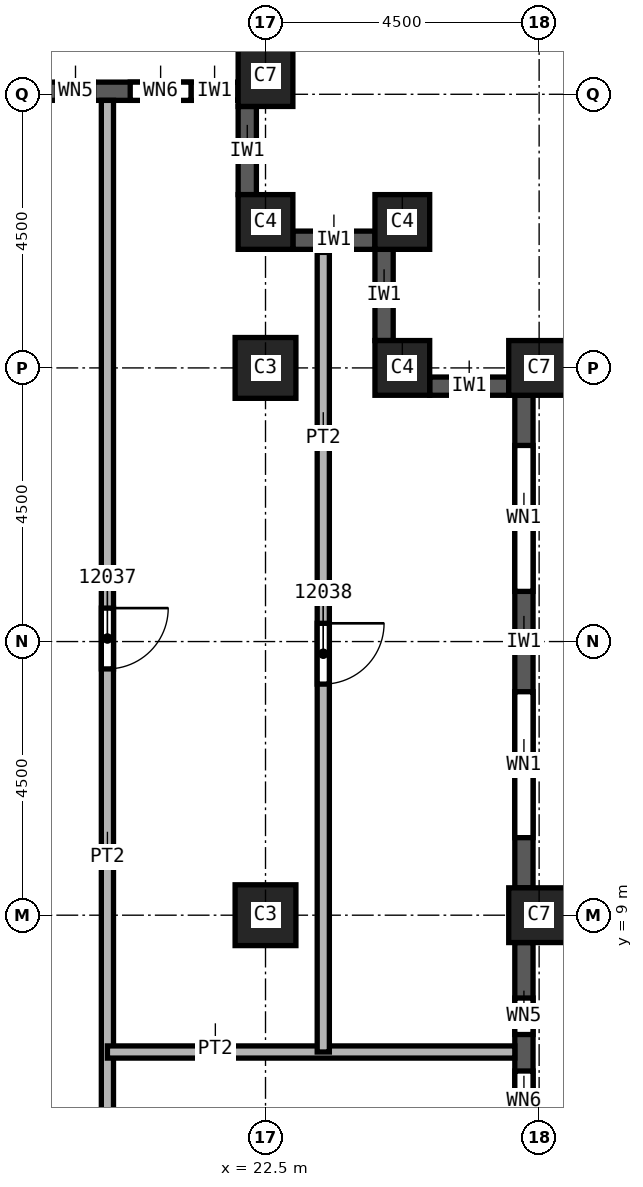
"""IFC4 building model, lengths in metres.
Left out: names, types, materials, properties, quantities, classifications, styles, units other than length and angle.
Written with IfcOpenShell. Run it as: python <this file> out.ifc"""

import sys

from ifc_helpers import new_model, si_unit, direction, frame, frame_2d, origin, origin_2d, place, context, subcontext, project, spatial, rectangle, extrude, element, fill, save


model = new_model("IFC4")
c1 = context("Model", 3, precision=1e-05, world=origin(), true_north=direction((0.0, 1.0)))
c2 = subcontext(c1, "Body", "Model", "MODEL_VIEW")
j1 = project(units=[si_unit("LENGTHUNIT", "METRE"), si_unit("PLANEANGLEUNIT", "RADIAN")], contexts=[c1])
p1 = place(None, origin())
s1 = spatial("IfcSite", under=j1, at=p1, CompositionType="ELEMENT")
p2 = place(p1, origin())
s2 = spatial("IfcBuilding", under=s1, at=p2, CompositionType="ELEMENT")
p3 = place(p2, frame((0.0, 0.0, 196.0)))
s3 = spatial("IfcBuildingStorey", under=s2, at=p3, CompositionType="ELEMENT", Elevation=196.0)
for number, where, z_axis, x_axis in (
    (1, (22.5, 9.0, 0.0), (0.0, 0.0, 1.0), (1.0, 0.0, 0.0)),
    (2, (22.5, 18.0, 0.0), (0.0, 0.0, 1.0), (1.0, 0.0, 0.0)),
):
    element("IfcColumn", number, at=place(p3, frame(where, z_axis=z_axis, x_axis=x_axis)), inside=s3, PredefinedType="COLUMN", context=c2, shape_type="SweptSolid", body=[
        extrude(rectangle(XDim=1.0, YDim=1.0, at=origin_2d()), origin(), (0.0, 0.0, 1.0), 3.72),
    ])
for number, where, z_axis, x_axis in (
    (3, (27.0, 9.0, 0.0), (0.0, 0.0, 1.0), (0.0, 1.0, 0.0)),
    (4, (27.0, 18.0, 0.0), (0.0, 0.0, 1.0), (0.0, 1.0, 0.0)),
    (5, (22.5, 22.8, 0.0), (0.0, 0.0, 1.0), (1.0, 0.0, 0.0)),
):
    element("IfcColumn", number, at=place(p3, frame(where, z_axis=z_axis, x_axis=x_axis)), inside=s3, PredefinedType="COLUMN", context=c2, shape_type="SweptSolid", body=[
        extrude(rectangle(XDim=0.9, YDim=1.0, at=origin_2d()), origin(), (0.0, 0.0, 1.0), 3.72),
    ])
for number, where, z_axis, x_axis in (
    (6, (22.5, 20.4, 0.0), (0.0, 0.0, 1.0), (1.0, 0.0, 0.0)),
    (7, (24.75, 20.4, 0.0), (0.0, 0.0, 1.0), (1.0, 0.0, 0.0)),
    (8, (24.75, 18.0, 0.0), (0.0, 0.0, 1.0), (1.0, 0.0, 0.0)),
):
    element("IfcColumn", number, at=place(p3, frame(where, z_axis=z_axis, x_axis=x_axis)), inside=s3, PredefinedType="COLUMN", context=c2, shape_type="SweptSolid", body=[
        extrude(rectangle(XDim=0.9, YDim=0.9, at=origin_2d()), origin(), (0.0, 0.0, 1.0), 3.72),
    ])
p4 = place(p3, frame((26.75, 0.45, 0.0), z_axis=(0.0, 0.0, 1.0), x_axis=(0.0, 1.0, 0.0)))
e9 = element("IfcWall", 9, at=p4, inside=s3, PredefinedType="SOLIDWALL", context=c2, shape_type="SweptSolid", body=[
    extrude(rectangle(XDim=8.1, YDim=0.3, at=frame_2d((4.05, 0.0))), origin(), (0.0, 0.0, 1.0), 3.12),
])
p5 = place(p4, frame((0.825, 0.0, 0.8)))
e10 = element("IfcOpeningElement", 10, at=p5, cuts=e9, PredefinedType="OPENING", context=c2, shape_type="SweptSolid", body=[
    extrude(rectangle(XDim=2.4, YDim=1.95, at=frame_2d((1.2, 0.975))), frame((0.0, 0.15, 0.0), z_axis=(0.0, -1.0, 0.0), x_axis=(1.0, 0.0, 0.0)), (0.0, 0.0, 1.0), 0.3),
])
p6 = place(p4, frame((4.988, 0.0, 0.8)))
e11 = element("IfcOpeningElement", 11, at=p6, cuts=e9, PredefinedType="OPENING", context=c2, shape_type="SweptSolid", body=[
    extrude(rectangle(XDim=1.0, YDim=1.95, at=frame_2d((0.5, 0.975))), frame((0.0, 0.15, 0.0), z_axis=(0.0, -1.0, 0.0), x_axis=(1.0, 0.0, 0.0)), (0.0, 0.0, 1.0), 0.3),
])
p7 = place(p4, frame((6.587, 0.0, 0.8)))
e12 = element("IfcOpeningElement", 12, at=p7, cuts=e9, PredefinedType="OPENING", context=c2, shape_type="SweptSolid", body=[
    extrude(rectangle(XDim=0.6, YDim=1.95, at=frame_2d((0.3, 0.975))), frame((0.0, 0.15, 0.0), z_axis=(0.0, -1.0, 0.0), x_axis=(1.0, 0.0, 0.0)), (0.0, 0.0, 1.0), 0.3),
])
p8 = place(p3, frame((26.75, 9.45, 0.0), z_axis=(0.0, 0.0, 1.0), x_axis=(0.0, 1.0, 0.0)))
e13 = element("IfcWall", 13, at=p8, inside=s3, PredefinedType="SOLIDWALL", context=c2, shape_type="SweptSolid", body=[
    extrude(rectangle(XDim=8.1, YDim=0.3, at=frame_2d((4.05, 0.0))), origin(), (0.0, 0.0, 1.0), 3.12),
])
p9 = place(p8, frame((0.825, 0.0, 0.8)))
e14 = element("IfcOpeningElement", 14, at=p9, cuts=e13, PredefinedType="OPENING", context=c2, shape_type="SweptSolid", body=[
    extrude(rectangle(XDim=2.4, YDim=1.95, at=frame_2d((1.2, 0.975))), frame((0.0, 0.15, 0.0), z_axis=(0.0, -1.0, 0.0), x_axis=(1.0, 0.0, 0.0)), (0.0, 0.0, 1.0), 0.3),
])
p10 = place(p8, frame((4.875, 0.0, 0.8)))
e15 = element("IfcOpeningElement", 15, at=p10, cuts=e13, PredefinedType="OPENING", context=c2, shape_type="SweptSolid", body=[
    extrude(rectangle(XDim=2.4, YDim=1.95, at=frame_2d((1.2, 0.975))), frame((0.0, 0.15, 0.0), z_axis=(0.0, -1.0, 0.0), x_axis=(1.0, 0.0, 0.0)), (0.0, 0.0, 1.0), 0.3),
])
p11 = place(p3, frame((26.5, 17.7, 0.0), z_axis=(0.0, 0.0, 1.0), x_axis=(-1.0, 0.0, 0.0)))
e16 = element("IfcWall", 16, at=p11, inside=s3, PredefinedType="SOLIDWALL", context=c2, shape_type="SweptSolid", body=[
    extrude(rectangle(XDim=1.3, YDim=0.3, at=frame_2d((0.65, 0.0))), origin(), (0.0, 0.0, 1.0), 3.12),
])
p12 = place(p3, frame((24.45, 18.45, 0.0), z_axis=(0.0, 0.0, 1.0), x_axis=(0.0, 1.0, 0.0)))
e17 = element("IfcWall", 17, at=p12, inside=s3, PredefinedType="SOLIDWALL", context=c2, shape_type="SweptSolid", body=[
    extrude(rectangle(XDim=1.5, YDim=0.3, at=frame_2d((0.75, 0.0))), origin(), (0.0, 0.0, 1.0), 3.12),
])
p13 = place(p3, frame((24.3, 20.1, 0.0), z_axis=(0.0, 0.0, 1.0), x_axis=(-1.0, 0.0, 0.0)))
e18 = element("IfcWall", 18, at=p13, inside=s3, PredefinedType="SOLIDWALL", context=c2, shape_type="SweptSolid", body=[
    extrude(rectangle(XDim=1.35, YDim=0.3, at=frame_2d((0.675, 0.0))), origin(), (0.0, 0.0, 1.0), 3.12),
])
p14 = place(p3, frame((22.2, 20.85, 0.0), z_axis=(0.0, 0.0, 1.0), x_axis=(0.0, 1.0, 0.0)))
e19 = element("IfcWall", 19, at=p14, inside=s3, PredefinedType="SOLIDWALL", context=c2, shape_type="SweptSolid", body=[
    extrude(rectangle(XDim=1.45, YDim=0.3, at=frame_2d((0.725, 0.0))), origin(), (0.0, 0.0, 1.0), 3.12),
])
p15 = place(p3, frame((22.05, 22.55, 0.0), z_axis=(0.0, 0.0, 1.0), x_axis=(-1.0, 0.0, 0.0)))
e20 = element("IfcWall", 20, at=p15, inside=s3, PredefinedType="SOLIDWALL", context=c2, shape_type="SweptSolid", body=[
    extrude(rectangle(XDim=3.6, YDim=0.3, at=frame_2d((1.8, 0.0))), origin(), (0.0, 0.0, 1.0), 3.12),
])
p16 = place(p15, frame((0.775, 0.0, 0.8)))
e21 = element("IfcOpeningElement", 21, at=p16, cuts=e20, PredefinedType="OPENING", context=c2, shape_type="SweptSolid", body=[
    extrude(rectangle(XDim=1.0, YDim=1.95, at=frame_2d((0.5, 0.975))), frame((0.0, 0.15, 0.0), z_axis=(0.0, -1.0, 0.0), x_axis=(1.0, 0.0, 0.0)), (0.0, 0.0, 1.0), 0.3),
])
p17 = place(p15, frame((2.375, 0.0, 0.8)))
e22 = element("IfcOpeningElement", 22, at=p17, cuts=e20, PredefinedType="OPENING", context=c2, shape_type="SweptSolid", body=[
    extrude(rectangle(XDim=0.6, YDim=1.95, at=frame_2d((0.3, 0.975))), frame((0.0, 0.15, 0.0), z_axis=(0.0, -1.0, 0.0), x_axis=(1.0, 0.0, 0.0)), (0.0, 0.0, 1.0), 0.3),
])
p18 = place(p3, frame((19.9, 22.4, 0.0), z_axis=(0.0, 0.0, 1.0), x_axis=(0.0, -1.0, 0.0)))
e23 = element("IfcWall", 23, at=p18, inside=s3, PredefinedType="PARTITIONING", context=c2, shape_type="SweptSolid", body=[
    extrude(rectangle(XDim=44.8, YDim=0.2, at=frame_2d((22.4, 0.0))), origin(), (0.0, 0.0, 1.0), 3.72),
])
p19 = place(p18, frame((20.3, 0.0, 0.0)))
e24 = element("IfcOpeningElement", 24, at=p19, cuts=e23, PredefinedType="OPENING", context=c2, shape_type="SweptSolid", body=[
    extrude(rectangle(XDim=1.0, YDim=2.1, at=frame_2d((0.5, 1.05))), frame((0.0, 0.1, 0.0), z_axis=(0.0, -1.0, 0.0), x_axis=(1.0, 0.0, 0.0)), (0.0, 0.0, 1.0), 0.2),
])
p20 = place(p18, frame((8.35, 0.0, 0.0)))
e25 = element("IfcOpeningElement", 25, at=p20, cuts=e23, PredefinedType="OPENING", context=c2, shape_type="SweptSolid", body=[
    extrude(rectangle(XDim=1.0, YDim=2.1, at=frame_2d((0.5, 1.05))), frame((0.0, 0.1, 0.0), z_axis=(0.0, -1.0, 0.0), x_axis=(1.0, 0.0, 0.0)), (0.0, 0.0, 1.0), 0.2),
])
p21 = place(p18, frame((40.1, 0.0, 0.0)))
e26 = element("IfcOpeningElement", 26, at=p21, cuts=e23, PredefinedType="OPENING", context=c2, shape_type="SweptSolid", body=[
    extrude(rectangle(XDim=1.0, YDim=2.1, at=frame_2d((0.5, 1.05))), frame((0.0, 0.1, 0.0), z_axis=(0.0, -1.0, 0.0), x_axis=(1.0, 0.0, 0.0)), (0.0, 0.0, 1.0), 0.2),
])
p22 = place(p18, frame((33.8, 0.0, 0.0)))
e27 = element("IfcOpeningElement", 27, at=p22, cuts=e23, PredefinedType="OPENING", context=c2, shape_type="SweptSolid", body=[
    extrude(rectangle(XDim=1.0, YDim=2.1, at=frame_2d((0.5, 1.05))), frame((0.0, 0.1, 0.0), z_axis=(0.0, -1.0, 0.0), x_axis=(1.0, 0.0, 0.0)), (0.0, 0.0, 1.0), 0.2),
])
p23 = place(p18, frame((27.05, 0.0, 0.0)))
e28 = element("IfcOpeningElement", 28, at=p23, cuts=e23, PredefinedType="OPENING", context=c2, shape_type="SweptSolid", body=[
    extrude(rectangle(XDim=1.0, YDim=2.1, at=frame_2d((0.5, 1.05))), frame((0.0, 0.1, 0.0), z_axis=(0.0, -1.0, 0.0), x_axis=(1.0, 0.0, 0.0)), (0.0, 0.0, 1.0), 0.2),
])
p24 = place(p18, frame((25.7, 0.0, 0.0)))
e29 = element("IfcOpeningElement", 29, at=p24, cuts=e23, PredefinedType="OPENING", context=c2, shape_type="SweptSolid", body=[
    extrude(rectangle(XDim=1.0, YDim=2.1, at=frame_2d((0.5, 1.05))), frame((0.0, 0.1, 0.0), z_axis=(0.0, -1.0, 0.0), x_axis=(1.0, 0.0, 0.0)), (0.0, 0.0, 1.0), 0.2),
])
p25 = place(p3, frame((19.9, 6.75, 0.0), z_axis=(0.0, 0.0, 1.0), x_axis=(1.0, 0.0, 0.0)))
e30 = element("IfcWall", 30, at=p25, inside=s3, PredefinedType="PARTITIONING", context=c2, shape_type="SweptSolid", body=[
    extrude(rectangle(XDim=6.7, YDim=0.2, at=frame_2d((3.35, 0.0))), origin(), (0.0, 0.0, 1.0), 3.72),
])
p26 = place(p3, frame((23.45, 19.9, 0.0), z_axis=(0.0, 0.0, 1.0), x_axis=(0.0, -1.0, 0.0)))
e31 = element("IfcWall", 31, at=p26, inside=s3, PredefinedType="PARTITIONING", context=c2, shape_type="SweptSolid", body=[
    extrude(rectangle(XDim=13.15, YDim=0.2, at=frame_2d((6.575, 0.0))), origin(), (0.0, 0.0, 1.0), 3.72),
])
p27 = place(p26, frame((6.1, 0.0, 0.0)))
e32 = element("IfcOpeningElement", 32, at=p27, cuts=e31, PredefinedType="OPENING", context=c2, shape_type="SweptSolid", body=[
    extrude(rectangle(XDim=1.0, YDim=2.1, at=frame_2d((0.5, 1.05))), frame((0.0, 0.1, 0.0), z_axis=(0.0, -1.0, 0.0), x_axis=(1.0, 0.0, 0.0)), (0.0, 0.0, 1.0), 0.2),
])
p28 = place(p9, origin())
e33 = element("IfcWindow", 33, at=p28, inside=s3, PartitioningType="SINGLE_PANEL", PredefinedType="WINDOW", context=c2, shape_type="SweptSolid", body=[
    extrude(rectangle(XDim=2.4, YDim=1.95, at=frame_2d((1.2, 0.975))), frame((0.0, 0.03, 0.0), z_axis=(0.0, -1.0, 0.0), x_axis=(1.0, 0.0, 0.0)), (0.0, 0.0, 1.0), 0.06),
])
fill(e14, e33)
p29 = place(p10, origin())
e34 = element("IfcWindow", 34, at=p29, inside=s3, PartitioningType="SINGLE_PANEL", PredefinedType="WINDOW", context=c2, shape_type="SweptSolid", body=[
    extrude(rectangle(XDim=2.4, YDim=1.95, at=frame_2d((1.2, 0.975))), frame((0.0, 0.03, 0.0), z_axis=(0.0, -1.0, 0.0), x_axis=(1.0, 0.0, 0.0)), (0.0, 0.0, 1.0), 0.06),
])
fill(e15, e34)
p30 = place(p20, origin())
e35 = element("IfcDoor", 35, at=p30, inside=s3, OperationType="SINGLE_SWING_RIGHT", PredefinedType="DOOR", context=c2, shape_type="SweptSolid", body=[
    extrude(rectangle(XDim=1.0, YDim=2.1, at=frame_2d((0.5, 1.05))), frame((0.0, 0.025, 0.0), z_axis=(0.0, -1.0, 0.0), x_axis=(1.0, 0.0, 0.0)), (0.0, 0.0, 1.0), 0.05),
])
fill(e25, e35)
p31 = place(p27, origin())
e36 = element("IfcDoor", 36, at=p31, inside=s3, OperationType="SINGLE_SWING_LEFT", PredefinedType="DOOR", context=c2, shape_type="SweptSolid", body=[
    extrude(rectangle(XDim=1.0, YDim=2.1, at=frame_2d((0.5, 1.05))), frame((0.0, 0.025, 0.0), z_axis=(0.0, -1.0, 0.0), x_axis=(1.0, 0.0, 0.0)), (0.0, 0.0, 1.0), 0.05),
])
fill(e32, e36)
p32 = place(p6, origin())
e37 = element("IfcWindow", 37, at=p32, inside=s3, PartitioningType="SINGLE_PANEL", PredefinedType="WINDOW", context=c2, shape_type="SweptSolid", body=[
    extrude(rectangle(XDim=1.0, YDim=1.95, at=frame_2d((0.5, 0.975))), frame((0.0, 0.03, 0.0), z_axis=(0.0, -1.0, 0.0), x_axis=(1.0, 0.0, 0.0)), (0.0, 0.0, 1.0), 0.06),
])
fill(e11, e37)
p33 = place(p7, origin())
e38 = element("IfcWindow", 38, at=p33, inside=s3, PartitioningType="SINGLE_PANEL", PredefinedType="WINDOW", context=c2, shape_type="SweptSolid", body=[
    extrude(rectangle(XDim=0.6, YDim=1.95, at=frame_2d((0.3, 0.975))), frame((0.0, 0.03, 0.0), z_axis=(0.0, -1.0, 0.0), x_axis=(1.0, 0.0, 0.0)), (0.0, 0.0, 1.0), 0.06),
])
fill(e12, e38)
p34 = place(p16, origin())
e39 = element("IfcWindow", 39, at=p34, inside=s3, PartitioningType="SINGLE_PANEL", PredefinedType="WINDOW", context=c2, shape_type="SweptSolid", body=[
    extrude(rectangle(XDim=1.0, YDim=1.95, at=frame_2d((0.5, 0.975))), frame((0.0, 0.03, 0.0), z_axis=(0.0, -1.0, 0.0), x_axis=(1.0, 0.0, 0.0)), (0.0, 0.0, 1.0), 0.06),
])
fill(e21, e39)
p35 = place(p17, origin())
e40 = element("IfcWindow", 40, at=p35, inside=s3, PartitioningType="SINGLE_PANEL", PredefinedType="WINDOW", context=c2, shape_type="SweptSolid", body=[
    extrude(rectangle(XDim=0.6, YDim=1.95, at=frame_2d((0.3, 0.975))), frame((0.0, 0.03, 0.0), z_axis=(0.0, -1.0, 0.0), x_axis=(1.0, 0.0, 0.0)), (0.0, 0.0, 1.0), 0.06),
])
fill(e22, e40)
save(model, sys.argv[1])
